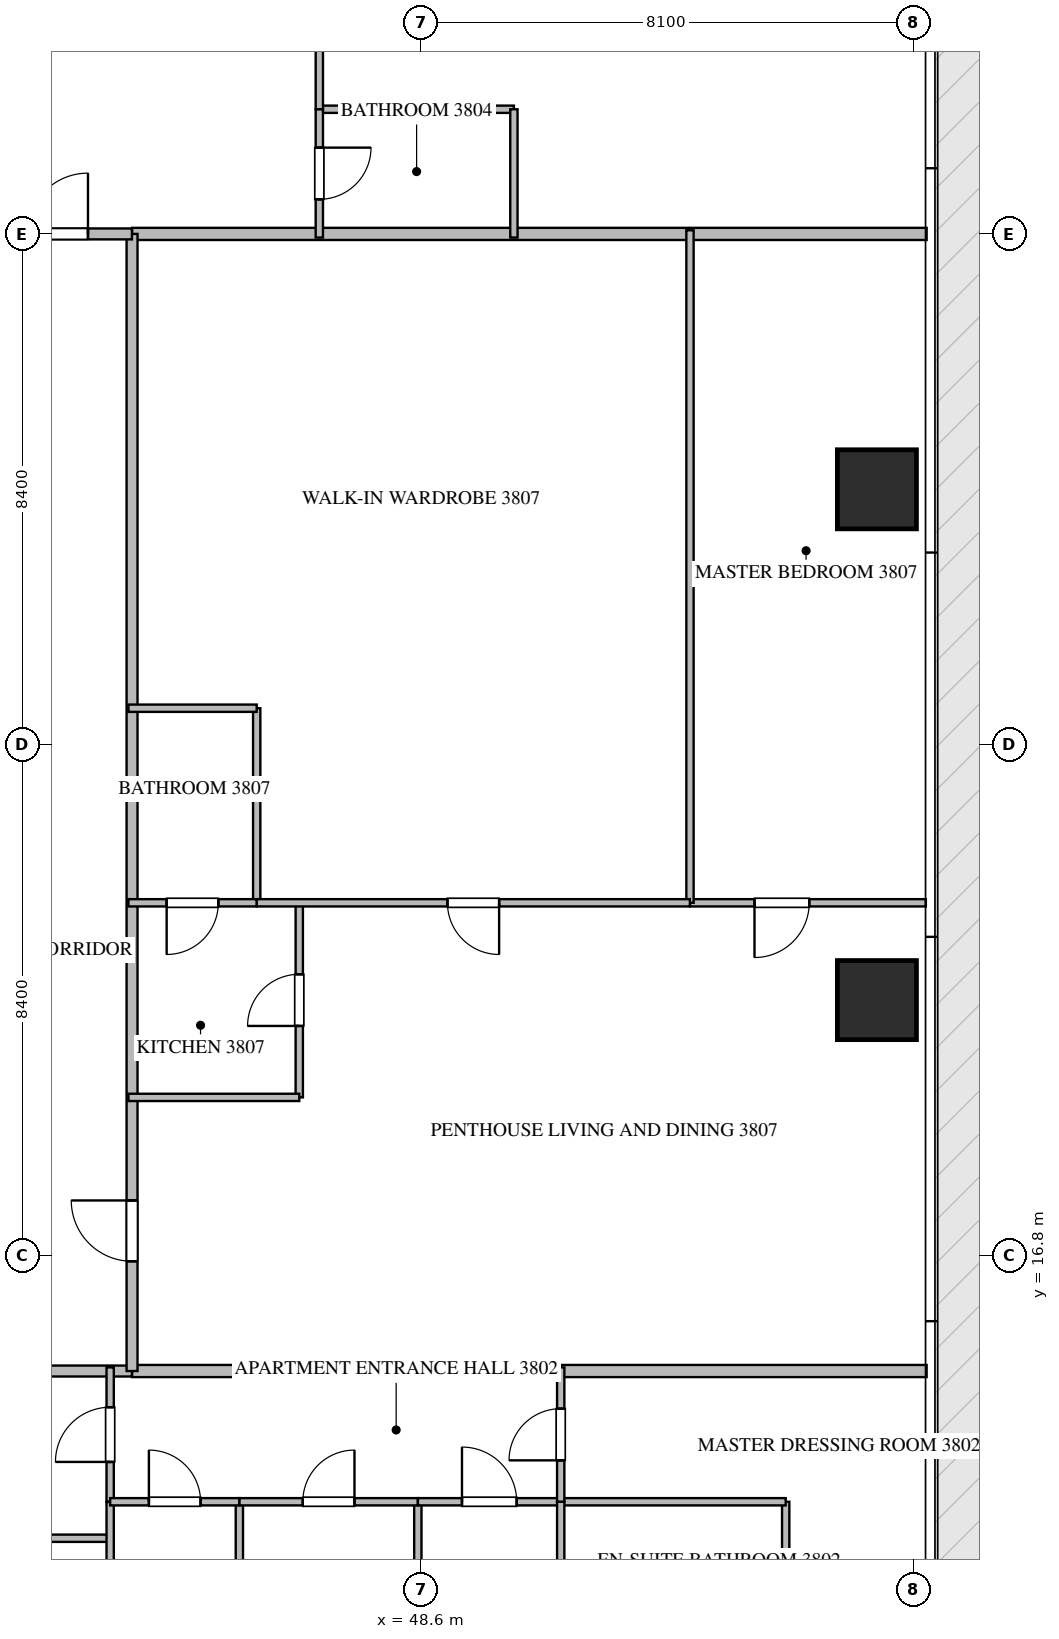
"""IFC4 building model, lengths in metres.
Left out: names, types, materials, properties, quantities, classifications, styles, units other than length and angle.
Written with IfcOpenShell. Run it as: python <this file> out.ifc"""

import sys

from ifc_helpers import new_model, si_unit, direction, frame, frame_2d, origin, origin_2d, place, context, subcontext, project, spatial, rectangle, extrude, source, transform, mapped, element, fill, save


model = new_model("IFC4")
c1 = context("Model", 3, precision=1e-05, world=origin(), true_north=direction((0.0, 1.0)))
c2 = subcontext(c1, "Body", "Model", "MODEL_VIEW")
j1 = project(units=[si_unit("LENGTHUNIT", "METRE"), si_unit("PLANEANGLEUNIT", "RADIAN")], contexts=[c1])
p1 = place(None, origin())
s1 = spatial("IfcSite", under=j1, at=p1, CompositionType="ELEMENT")
p2 = place(p1, origin())
s2 = spatial("IfcBuilding", under=s1, at=p2, CompositionType="ELEMENT")
p3 = place(p2, frame((0.0, 0.0, 153.9)))
s3 = spatial("IfcBuildingStorey", under=s2, at=p3, CompositionType="ELEMENT", Elevation=153.9)
m1 = source(origin(), c2, "Body", "SweptSolid", [
    extrude(rectangle(XDim=1.3, YDim=1.3, at=origin_2d()), origin(), (0.0, 0.0, 1.0), 3.75),
])
for number, where, z_axis, x_axis in (
    (1, (56.1, 21.0, -0.26), (0.0, 0.0, 1.0), (1.0, 0.0, 0.0)),
    (2, (56.1, 29.4, -0.26), (0.0, 0.0, 1.0), (1.0, 0.0, 0.0)),
):
    element("IfcColumn", number, at=place(p3, frame(where, z_axis=z_axis, x_axis=x_axis)), inside=s3, PredefinedType="COLUMN", context=c2, shape_type="MappedRepresentation", body=[
        mapped(m1, transform((0.0, 0.0, 0.0), scale=1.0)),
    ])
for number, where, z_axis, x_axis in (
    (3, (43.85, 14.9, 0.0), (0.0, 0.0, 1.0), (1.0, 0.0, 0.0)),
    (4, (43.85, 33.6, 0.0), (0.0, 0.0, 1.0), (1.0, 0.0, 0.0)),
):
    element("IfcWall", number, at=place(p3, frame(where, z_axis=z_axis, x_axis=x_axis)), inside=s3, PredefinedType="PARTITIONING", context=c2, shape_type="SweptSolid", body=[
        extrude(rectangle(XDim=13.068, YDim=0.2, at=frame_2d((6.534, 0.0))), origin(), (0.0, 0.0, 1.0), 3.49),
    ])
p4 = place(p3, frame((20.952, 14.9, 0.0), z_axis=(0.0, 0.0, 1.0), x_axis=(1.0, 0.0, 0.0)))
e5 = element("IfcWall", 5, at=p4, inside=s3, PredefinedType="PARTITIONING", context=c2, shape_type="SweptSolid", body=[
    extrude(rectangle(XDim=22.896, YDim=0.18, at=frame_2d((11.448, 0.0))), origin(), (0.0, 0.0, 1.0), 3.49),
])
p5 = place(p4, frame((5.934, 0.0, 0.0)))
e6 = element("IfcOpeningElement", 6, at=p5, cuts=e5, PredefinedType="OPENING", context=c2, shape_type="SweptSolid", body=[
    extrude(rectangle(XDim=1.0, YDim=2.15, at=frame_2d((0.5, 1.075))), frame((0.0, 0.1, 0.0), z_axis=(0.0, -1.0, 0.0), x_axis=(1.0, 0.0, 0.0)), (0.0, 0.0, 1.0), 0.2),
])
p6 = place(p4, frame((16.51, 0.0, 0.0)))
e7 = element("IfcOpeningElement", 7, at=p6, cuts=e5, PredefinedType="OPENING", context=c2, shape_type="SweptSolid", body=[
    extrude(rectangle(XDim=1.0, YDim=2.15, at=frame_2d((0.5, 1.075))), frame((0.0, 0.1, 0.0), z_axis=(0.0, -1.0, 0.0), x_axis=(1.0, 0.0, 0.0)), (0.0, 0.0, 1.0), 0.2),
])
p7 = place(p3, frame((43.85, 14.9, 0.0), z_axis=(0.0, 0.0, 1.0), x_axis=(0.0, 1.0, 0.0)))
e8 = element("IfcWall", 8, at=p7, inside=s3, PredefinedType="PARTITIONING", context=c2, shape_type="SweptSolid", body=[
    extrude(rectangle(XDim=18.7, YDim=0.18, at=frame_2d((9.35, 0.0))), origin(), (0.0, 0.0, 1.0), 3.49),
])
p8 = place(p7, frame((1.805, 0.0, 0.0)))
e9 = element("IfcOpeningElement", 9, at=p8, cuts=e8, PredefinedType="OPENING", context=c2, shape_type="SweptSolid", body=[
    extrude(rectangle(XDim=1.0, YDim=2.15, at=frame_2d((0.5, 1.075))), frame((0.0, 0.1, 0.0), z_axis=(0.0, -1.0, 0.0), x_axis=(1.0, 0.0, 0.0)), (0.0, 0.0, 1.0), 0.2),
])
p9 = place(p3, frame((41.402, 33.6, 0.0), z_axis=(0.0, 0.0, 1.0), x_axis=(1.0, 0.0, 0.0)))
e10 = element("IfcWall", 10, at=p9, inside=s3, PredefinedType="PARTITIONING", context=c2, shape_type="SweptSolid", body=[
    extrude(rectangle(XDim=2.446, YDim=0.18, at=frame_2d((1.223, 0.0))), origin(), (0.0, 0.0, 1.0), 3.49),
])
p10 = place(p9, frame((0.723, 0.0, 0.0)))
e11 = element("IfcOpeningElement", 11, at=p10, cuts=e10, PredefinedType="OPENING", context=c2, shape_type="SweptSolid", body=[
    extrude(rectangle(XDim=1.0, YDim=2.15, at=frame_2d((0.5, 1.075))), frame((0.0, 0.1, 0.0), z_axis=(0.0, -1.0, 0.0), x_axis=(1.0, 0.0, 0.0)), (0.0, 0.0, 1.0), 0.2),
])
p11 = place(p3, frame((40.64, 12.15, 0.0), z_axis=(0.0, 0.0, 1.0), x_axis=(1.0, 0.0, 0.0)))
e12 = element("IfcWall", 12, at=p11, inside=s3, PredefinedType="PARTITIONING", context=c2, shape_type="SweptSolid", body=[
    extrude(rectangle(XDim=2.85, YDim=0.12, at=frame_2d((1.425, 0.0))), origin(), (0.0, 0.0, 1.0), 3.49),
])
p12 = place(p11, frame((1.0, 0.0, 0.0)))
e13 = element("IfcOpeningElement", 13, at=p12, cuts=e12, PredefinedType="OPENING", context=c2, shape_type="SweptSolid", body=[
    extrude(rectangle(XDim=0.85, YDim=2.1, at=frame_2d((0.425, 1.05))), frame((0.0, 0.07, 0.0), z_axis=(0.0, -1.0, 0.0), x_axis=(1.0, 0.0, 0.0)), (0.0, 0.0, 1.0), 0.14),
])
p13 = place(p3, frame((43.49, 12.75, 0.0), z_axis=(0.0, 0.0, 1.0), x_axis=(0.0, 1.0, 0.0)))
e14 = element("IfcWall", 14, at=p13, inside=s3, PredefinedType="PARTITIONING", context=c2, shape_type="SweptSolid", body=[
    extrude(rectangle(XDim=2.21, YDim=0.12, at=frame_2d((1.105, 0.0))), origin(), (0.0, 0.0, 1.0), 3.49),
])
p14 = place(p13, frame((0.655, 0.0, 0.0)))
e15 = element("IfcOpeningElement", 15, at=p14, cuts=e14, PredefinedType="OPENING", context=c2, shape_type="SweptSolid", body=[
    extrude(rectangle(XDim=0.9, YDim=2.1, at=frame_2d((0.45, 1.05))), frame((0.0, 0.07, 0.0), z_axis=(0.0, -1.0, 0.0), x_axis=(1.0, 0.0, 0.0)), (0.0, 0.0, 1.0), 0.14),
])
p15 = place(p3, frame((43.49, 8.473, 0.0), z_axis=(0.0, 0.0, 1.0), x_axis=(0.0, 1.0, 0.0)))
e16 = element("IfcWall", 16, at=p15, inside=s3, PredefinedType="PARTITIONING", context=c2, shape_type="SweptSolid", body=[
    extrude(rectangle(XDim=4.275, YDim=0.12, at=frame_2d((2.138, 0.0))), origin(), (0.0, 0.0, 1.0), 3.49),
])
p16 = place(p3, frame((48.55, 1.495, 0.0), z_axis=(0.0, 0.0, 1.0), x_axis=(0.0, 1.0, 0.0)))
e17 = element("IfcWall", 17, at=p16, inside=s3, PredefinedType="PARTITIONING", context=c2, shape_type="SweptSolid", body=[
    extrude(rectangle(XDim=11.255, YDim=0.12, at=frame_2d((5.627, 0.0))), origin(), (0.0, 0.0, 1.0), 3.49),
])
p17 = place(p3, frame((45.615, 8.471, 0.0), z_axis=(0.0, 0.0, 1.0), x_axis=(0.0, 1.0, 0.0)))
e18 = element("IfcWall", 18, at=p17, inside=s3, PredefinedType="PARTITIONING", context=c2, shape_type="SweptSolid", body=[
    extrude(rectangle(XDim=4.279, YDim=0.12, at=frame_2d((2.14, 0.0))), origin(), (0.0, 0.0, 1.0), 3.49),
])
p18 = place(p3, frame((43.49, 12.75, 0.0), z_axis=(0.0, 0.0, 1.0), x_axis=(1.0, 0.0, 0.0)))
e19 = element("IfcWall", 19, at=p18, inside=s3, PredefinedType="PARTITIONING", context=c2, shape_type="SweptSolid", body=[
    extrude(rectangle(XDim=2.125, YDim=0.12, at=frame_2d((1.062, 0.0))), origin(), (0.0, 0.0, 1.0), 3.49),
])
p19 = place(p18, frame((0.637, 0.0, 0.0)))
e20 = element("IfcOpeningElement", 20, at=p19, cuts=e19, PredefinedType="OPENING", context=c2, shape_type="SweptSolid", body=[
    extrude(rectangle(XDim=0.85, YDim=2.1, at=frame_2d((0.425, 1.05))), frame((0.0, 0.07, 0.0), z_axis=(0.0, -1.0, 0.0), x_axis=(1.0, 0.0, 0.0)), (0.0, 0.0, 1.0), 0.14),
])
p20 = place(p3, frame((45.617, 12.75, 0.0), z_axis=(0.0, 0.0, 1.0), x_axis=(1.0, 0.0, 0.0)))
e21 = element("IfcWall", 21, at=p20, inside=s3, PredefinedType="PARTITIONING", context=c2, shape_type="SweptSolid", body=[
    extrude(rectangle(XDim=2.933, YDim=0.12, at=frame_2d((1.467, 0.0))), origin(), (0.0, 0.0, 1.0), 3.49),
])
p21 = place(p20, frame((1.041, 0.0, 0.0)))
e22 = element("IfcOpeningElement", 22, at=p21, cuts=e21, PredefinedType="OPENING", context=c2, shape_type="SweptSolid", body=[
    extrude(rectangle(XDim=0.85, YDim=2.1, at=frame_2d((0.425, 1.05))), frame((0.0, 0.07, 0.0), z_axis=(0.0, -1.0, 0.0), x_axis=(1.0, 0.0, 0.0)), (0.0, 0.0, 1.0), 0.14),
])
p22 = place(p3, frame((48.552, 12.75, 0.0), z_axis=(0.0, 0.0, 1.0), x_axis=(1.0, 0.0, 0.0)))
e23 = element("IfcWall", 23, at=p22, inside=s3, PredefinedType="PARTITIONING", context=c2, shape_type="SweptSolid", body=[
    extrude(rectangle(XDim=2.348, YDim=0.12, at=frame_2d((1.174, 0.0))), origin(), (0.0, 0.0, 1.0), 3.49),
])
p23 = place(p22, frame((0.724, 0.0, 0.0)))
e24 = element("IfcOpeningElement", 24, at=p23, cuts=e23, PredefinedType="OPENING", context=c2, shape_type="SweptSolid", body=[
    extrude(rectangle(XDim=0.9, YDim=2.1, at=frame_2d((0.45, 1.05))), frame((0.0, 0.07, 0.0), z_axis=(0.0, -1.0, 0.0), x_axis=(1.0, 0.0, 0.0)), (0.0, 0.0, 1.0), 0.14),
])
p24 = place(p3, frame((54.6, 9.495, 0.0), z_axis=(0.0, 0.0, 1.0), x_axis=(0.0, 1.0, 0.0)))
e25 = element("IfcWall", 25, at=p24, inside=s3, PredefinedType="PARTITIONING", context=c2, shape_type="SweptSolid", body=[
    extrude(rectangle(XDim=3.255, YDim=0.12, at=frame_2d((1.627, 0.0))), origin(), (0.0, 0.0, 1.0), 3.49),
])
p25 = place(p3, frame((50.902, 12.75, 0.0), z_axis=(0.0, 0.0, 1.0), x_axis=(1.0, 0.0, 0.0)))
e26 = element("IfcWall", 26, at=p25, inside=s3, PredefinedType="PARTITIONING", context=c2, shape_type="SweptSolid", body=[
    extrude(rectangle(XDim=3.698, YDim=0.12, at=frame_2d((1.849, 0.0))), origin(), (0.0, 0.0, 1.0), 3.49),
])
p26 = place(p3, frame((50.9, 9.895, 0.0), z_axis=(0.0, 0.0, 1.0), x_axis=(0.0, 1.0, 0.0)))
e27 = element("IfcWall", 27, at=p26, inside=s3, PredefinedType="PARTITIONING", context=c2, shape_type="SweptSolid", body=[
    extrude(rectangle(XDim=2.855, YDim=0.12, at=frame_2d((1.427, 0.0))), origin(), (0.0, 0.0, 1.0), 3.49),
])
p27 = place(p26, frame((1.003, 0.0, 0.0)))
e28 = element("IfcOpeningElement", 28, at=p27, cuts=e27, PredefinedType="OPENING", context=c2, shape_type="SweptSolid", body=[
    extrude(rectangle(XDim=0.85, YDim=2.1, at=frame_2d((0.425, 1.05))), frame((0.0, 0.07, 0.0), z_axis=(0.0, -1.0, 0.0), x_axis=(1.0, 0.0, 0.0)), (0.0, 0.0, 1.0), 0.14),
])
p28 = place(p3, frame((50.9, 12.752, 0.0), z_axis=(0.0, 0.0, 1.0), x_axis=(0.0, 1.0, 0.0)))
e29 = element("IfcWall", 29, at=p28, inside=s3, PredefinedType="PARTITIONING", context=c2, shape_type="SweptSolid", body=[
    extrude(rectangle(XDim=2.208, YDim=0.12, at=frame_2d((1.104, 0.0))), origin(), (0.0, 0.0, 1.0), 3.49),
])
p29 = place(p28, frame((0.679, 0.0, 0.0)))
e30 = element("IfcOpeningElement", 30, at=p29, cuts=e29, PredefinedType="OPENING", context=c2, shape_type="SweptSolid", body=[
    extrude(rectangle(XDim=0.85, YDim=2.1, at=frame_2d((0.425, 1.05))), frame((0.0, 0.07, 0.0), z_axis=(0.0, -1.0, 0.0), x_axis=(1.0, 0.0, 0.0)), (0.0, 0.0, 1.0), 0.14),
])
p30 = place(p3, frame((46.93, 35.65, 0.0), z_axis=(0.0, 0.0, 1.0), x_axis=(1.0, 0.0, 0.0)))
e31 = element("IfcWall", 31, at=p30, inside=s3, PredefinedType="PARTITIONING", context=c2, shape_type="SweptSolid", body=[
    extrude(rectangle(XDim=3.2, YDim=0.12, at=frame_2d((1.6, 0.0))), origin(), (0.0, 0.0, 1.0), 3.49),
])
p31 = place(p3, frame((50.13, 35.65, 0.0), z_axis=(0.0, 0.0, 1.0), x_axis=(0.0, -1.0, 0.0)))
e32 = element("IfcWall", 32, at=p31, inside=s3, PredefinedType="PARTITIONING", context=c2, shape_type="SweptSolid", body=[
    extrude(rectangle(XDim=2.11, YDim=0.12, at=frame_2d((1.055, 0.0))), origin(), (0.0, 0.0, 1.0), 3.49),
])
p32 = place(p3, frame((46.93, 41.073, 0.0), z_axis=(0.0, 0.0, 1.0), x_axis=(0.0, -1.0, 0.0)))
e33 = element("IfcWall", 33, at=p32, inside=s3, PredefinedType="PARTITIONING", context=c2, shape_type="SweptSolid", body=[
    extrude(rectangle(XDim=5.423, YDim=0.12, at=frame_2d((2.711, 0.0))), origin(), (0.0, 0.0, 1.0), 3.49),
])
p33 = place(p32, frame((2.287, 0.0, 0.0)))
e34 = element("IfcOpeningElement", 34, at=p33, cuts=e33, PredefinedType="OPENING", context=c2, shape_type="SweptSolid", body=[
    extrude(rectangle(XDim=0.85, YDim=2.1, at=frame_2d((0.425, 1.05))), frame((0.0, 0.07, 0.0), z_axis=(0.0, -1.0, 0.0), x_axis=(1.0, 0.0, 0.0)), (0.0, 0.0, 1.0), 0.14),
])
p34 = place(p3, frame((46.93, 35.648, 0.0), z_axis=(0.0, 0.0, 1.0), x_axis=(0.0, -1.0, 0.0)))
e35 = element("IfcWall", 35, at=p34, inside=s3, PredefinedType="PARTITIONING", context=c2, shape_type="SweptSolid", body=[
    extrude(rectangle(XDim=2.108, YDim=0.12, at=frame_2d((1.054, 0.0))), origin(), (0.0, 0.0, 1.0), 3.49),
])
p35 = place(p34, frame((0.629, 0.0, 0.0)))
e36 = element("IfcOpeningElement", 36, at=p35, cuts=e35, PredefinedType="OPENING", context=c2, shape_type="SweptSolid", body=[
    extrude(rectangle(XDim=0.85, YDim=2.1, at=frame_2d((0.425, 1.05))), frame((0.0, 0.07, 0.0), z_axis=(0.0, -1.0, 0.0), x_axis=(1.0, 0.0, 0.0)), (0.0, 0.0, 1.0), 0.14),
])
p36 = place(p3, frame((46.6, 19.4, 0.0), z_axis=(0.0, 0.0, 1.0), x_axis=(0.0, 1.0, 0.0)))
e37 = element("IfcWall", 37, at=p36, inside=s3, PredefinedType="PARTITIONING", context=c2, shape_type="SweptSolid", body=[
    extrude(rectangle(XDim=3.2, YDim=0.12, at=frame_2d((1.6, 0.0))), origin(), (0.0, 0.0, 1.0), 3.49),
])
p37 = place(p36, frame((1.175, 0.0, 0.0)))
e38 = element("IfcOpeningElement", 38, at=p37, cuts=e37, PredefinedType="OPENING", context=c2, shape_type="SweptSolid", body=[
    extrude(rectangle(XDim=0.85, YDim=2.1, at=frame_2d((0.425, 1.05))), frame((0.0, 0.07, 0.0), z_axis=(0.0, -1.0, 0.0), x_axis=(1.0, 0.0, 0.0)), (0.0, 0.0, 1.0), 0.14),
])
p38 = place(p3, frame((46.6, 19.4, 0.0), z_axis=(0.0, 0.0, 1.0), x_axis=(-1.0, 0.0, 0.0)))
e39 = element("IfcWall", 39, at=p38, inside=s3, PredefinedType="PARTITIONING", context=c2, shape_type="SweptSolid", body=[
    extrude(rectangle(XDim=2.81, YDim=0.12, at=frame_2d((1.405, 0.0))), origin(), (0.0, 0.0, 1.0), 3.49),
])
p39 = place(p3, frame((56.905, 22.6, 0.0), z_axis=(0.0, 0.0, 1.0), x_axis=(-1.0, 0.0, 0.0)))
e40 = element("IfcWall", 40, at=p39, inside=s3, PredefinedType="PARTITIONING", context=c2, shape_type="SweptSolid", body=[
    extrude(rectangle(XDim=3.879, YDim=0.12, at=frame_2d((1.939, 0.0))), origin(), (0.0, 0.0, 1.0), 3.49),
])
p40 = place(p39, frame((1.918, 0.0, 0.0)))
e41 = element("IfcOpeningElement", 41, at=p40, cuts=e40, PredefinedType="OPENING", context=c2, shape_type="SweptSolid", body=[
    extrude(rectangle(XDim=0.9, YDim=2.1, at=frame_2d((0.45, 1.05))), frame((0.0, 0.07, 0.0), z_axis=(0.0, -1.0, 0.0), x_axis=(1.0, 0.0, 0.0)), (0.0, 0.0, 1.0), 0.14),
])
p41 = place(p3, frame((53.026, 22.6, 0.0), z_axis=(0.0, 0.0, 1.0), x_axis=(0.0, 1.0, 0.0)))
e42 = element("IfcWall", 42, at=p41, inside=s3, PredefinedType="PARTITIONING", context=c2, shape_type="SweptSolid", body=[
    extrude(rectangle(XDim=11.06, YDim=0.12, at=frame_2d((5.53, 0.0))), origin(), (0.0, 0.0, 1.0), 3.49),
])
p42 = place(p3, frame((45.9, 22.6, 0.0), z_axis=(0.0, 0.0, 1.0), x_axis=(0.0, 1.0, 0.0)))
e43 = element("IfcWall", 43, at=p42, inside=s3, PredefinedType="PARTITIONING", context=c2, shape_type="SweptSolid", body=[
    extrude(rectangle(XDim=3.2, YDim=0.12, at=frame_2d((1.6, 0.0))), origin(), (0.0, 0.0, 1.0), 3.49),
])
p43 = place(p3, frame((45.9, 25.8, 0.0), z_axis=(0.0, 0.0, 1.0), x_axis=(-1.0, 0.0, 0.0)))
e44 = element("IfcWall", 44, at=p43, inside=s3, PredefinedType="PARTITIONING", context=c2, shape_type="SweptSolid", body=[
    extrude(rectangle(XDim=2.11, YDim=0.12, at=frame_2d((1.055, 0.0))), origin(), (0.0, 0.0, 1.0), 3.49),
])
p44 = place(p3, frame((53.024, 22.6, 0.0), z_axis=(0.0, 0.0, 1.0), x_axis=(-1.0, 0.0, 0.0)))
e45 = element("IfcWall", 45, at=p44, inside=s3, PredefinedType="PARTITIONING", context=c2, shape_type="SweptSolid", body=[
    extrude(rectangle(XDim=7.124, YDim=0.12, at=frame_2d((3.562, 0.0))), origin(), (0.0, 0.0, 1.0), 3.49),
])
p45 = place(p44, frame((3.137, 0.0, 0.0)))
e46 = element("IfcOpeningElement", 46, at=p45, cuts=e45, PredefinedType="OPENING", context=c2, shape_type="SweptSolid", body=[
    extrude(rectangle(XDim=0.85, YDim=2.1, at=frame_2d((0.425, 1.05))), frame((0.0, 0.07, 0.0), z_axis=(0.0, -1.0, 0.0), x_axis=(1.0, 0.0, 0.0)), (0.0, 0.0, 1.0), 0.14),
])
p46 = place(p3, frame((45.898, 22.6, 0.0), z_axis=(0.0, 0.0, 1.0), x_axis=(-1.0, 0.0, 0.0)))
e47 = element("IfcWall", 47, at=p46, inside=s3, PredefinedType="PARTITIONING", context=c2, shape_type="SweptSolid", body=[
    extrude(rectangle(XDim=2.108, YDim=0.12, at=frame_2d((1.054, 0.0))), origin(), (0.0, 0.0, 1.0), 3.49),
])
p47 = place(p46, frame((0.629, 0.0, 0.0)))
e48 = element("IfcOpeningElement", 48, at=p47, cuts=e47, PredefinedType="OPENING", context=c2, shape_type="SweptSolid", body=[
    extrude(rectangle(XDim=0.85, YDim=2.1, at=frame_2d((0.425, 1.05))), frame((0.0, 0.07, 0.0), z_axis=(0.0, -1.0, 0.0), x_axis=(1.0, 0.0, 0.0)), (0.0, 0.0, 1.0), 0.14),
])
m2 = source(origin(), c2, "Body", "SweptSolid", [
    extrude(rectangle(XDim=1.0, YDim=2.15, at=frame_2d((0.5, 1.075))), frame((0.0, 0.025, 0.0), z_axis=(0.0, -1.0, 0.0), x_axis=(1.0, 0.0, 0.0)), (0.0, 0.0, 1.0), 0.05),
])
p48 = place(p8, origin())
e49 = element("IfcDoor", 49, at=p48, inside=s3, OperationType="SINGLE_SWING_RIGHT", PredefinedType="DOOR", context=c2, shape_type="MappedRepresentation", body=[
    mapped(m2, transform((0.0, 0.0, 0.0), scale=1.0)),
])
fill(e9, e49)
p49 = place(p10, origin())
e50 = element("IfcDoor", 50, at=p49, inside=s3, OperationType="SINGLE_SWING_RIGHT", PredefinedType="DOOR", context=c2, shape_type="MappedRepresentation", body=[
    mapped(m2, transform((0.0, 0.0, 0.0), scale=1.0)),
])
fill(e11, e50)
m3 = source(origin(), c2, "Body", "SweptSolid", [
    extrude(rectangle(XDim=0.9, YDim=2.1, at=frame_2d((0.45, 1.05))), frame((0.0, 0.025, 0.0), z_axis=(0.0, -1.0, 0.0), x_axis=(1.0, 0.0, 0.0)), (0.0, 0.0, 1.0), 0.05),
])
p50 = place(p14, origin())
e51 = element("IfcDoor", 51, at=p50, inside=s3, OperationType="SINGLE_SWING_LEFT", PredefinedType="DOOR", context=c2, shape_type="MappedRepresentation", body=[
    mapped(m3, transform((0.0, 0.0, 0.0), scale=1.0)),
])
fill(e15, e51)
m4 = source(origin(), c2, "Body", "SweptSolid", [
    extrude(rectangle(XDim=0.85, YDim=2.1, at=frame_2d((0.425, 1.05))), frame((0.0, 0.025, 0.0), z_axis=(0.0, -1.0, 0.0), x_axis=(1.0, 0.0, 0.0)), (0.0, 0.0, 1.0), 0.05),
])
p51 = place(p19, origin())
e52 = element("IfcDoor", 52, at=p51, inside=s3, OperationType="SINGLE_SWING_LEFT", PredefinedType="DOOR", context=c2, shape_type="MappedRepresentation", body=[
    mapped(m4, transform((0.0, 0.0, 0.0), scale=1.0)),
])
fill(e20, e52)
p52 = place(p21, origin())
e53 = element("IfcDoor", 53, at=p52, inside=s3, OperationType="SINGLE_SWING_RIGHT", PredefinedType="DOOR", context=c2, shape_type="MappedRepresentation", body=[
    mapped(m4, transform((0.0, 0.0, 0.0), scale=1.0)),
])
fill(e22, e53)
p53 = place(p23, origin())
e54 = element("IfcDoor", 54, at=p53, inside=s3, OperationType="SINGLE_SWING_LEFT", PredefinedType="DOOR", context=c2, shape_type="MappedRepresentation", body=[
    mapped(m3, transform((0.0, 0.0, 0.0), scale=1.0)),
])
fill(e24, e54)
p54 = place(p29, origin())
e55 = element("IfcDoor", 55, at=p54, inside=s3, OperationType="SINGLE_SWING_LEFT", PredefinedType="DOOR", context=c2, shape_type="MappedRepresentation", body=[
    mapped(m4, transform((0.0, 0.0, 0.0), scale=1.0)),
])
fill(e30, e55)
p55 = place(p35, origin())
e56 = element("IfcDoor", 56, at=p55, inside=s3, OperationType="SINGLE_SWING_LEFT", PredefinedType="DOOR", context=c2, shape_type="MappedRepresentation", body=[
    mapped(m4, transform((0.0, 0.0, 0.0), scale=1.0)),
])
fill(e36, e56)
p56 = place(p37, origin())
e57 = element("IfcDoor", 57, at=p56, inside=s3, OperationType="SINGLE_SWING_LEFT", PredefinedType="DOOR", context=c2, shape_type="MappedRepresentation", body=[
    mapped(m4, transform((0.0, 0.0, 0.0), scale=1.0)),
])
fill(e38, e57)
p57 = place(p40, origin())
e58 = element("IfcDoor", 58, at=p57, inside=s3, OperationType="SINGLE_SWING_RIGHT", PredefinedType="DOOR", context=c2, shape_type="MappedRepresentation", body=[
    mapped(m3, transform((0.0, 0.0, 0.0), scale=1.0)),
])
fill(e41, e58)
p58 = place(p45, origin())
e59 = element("IfcDoor", 59, at=p58, inside=s3, OperationType="SINGLE_SWING_LEFT", PredefinedType="DOOR", context=c2, shape_type="MappedRepresentation", body=[
    mapped(m4, transform((0.0, 0.0, 0.0), scale=1.0)),
])
fill(e46, e59)
p59 = place(p47, origin())
e60 = element("IfcDoor", 60, at=p59, inside=s3, OperationType="SINGLE_SWING_RIGHT", PredefinedType="DOOR", context=c2, shape_type="MappedRepresentation", body=[
    mapped(m4, transform((0.0, 0.0, 0.0), scale=1.0)),
])
fill(e48, e60)
save(model, sys.argv[1])
